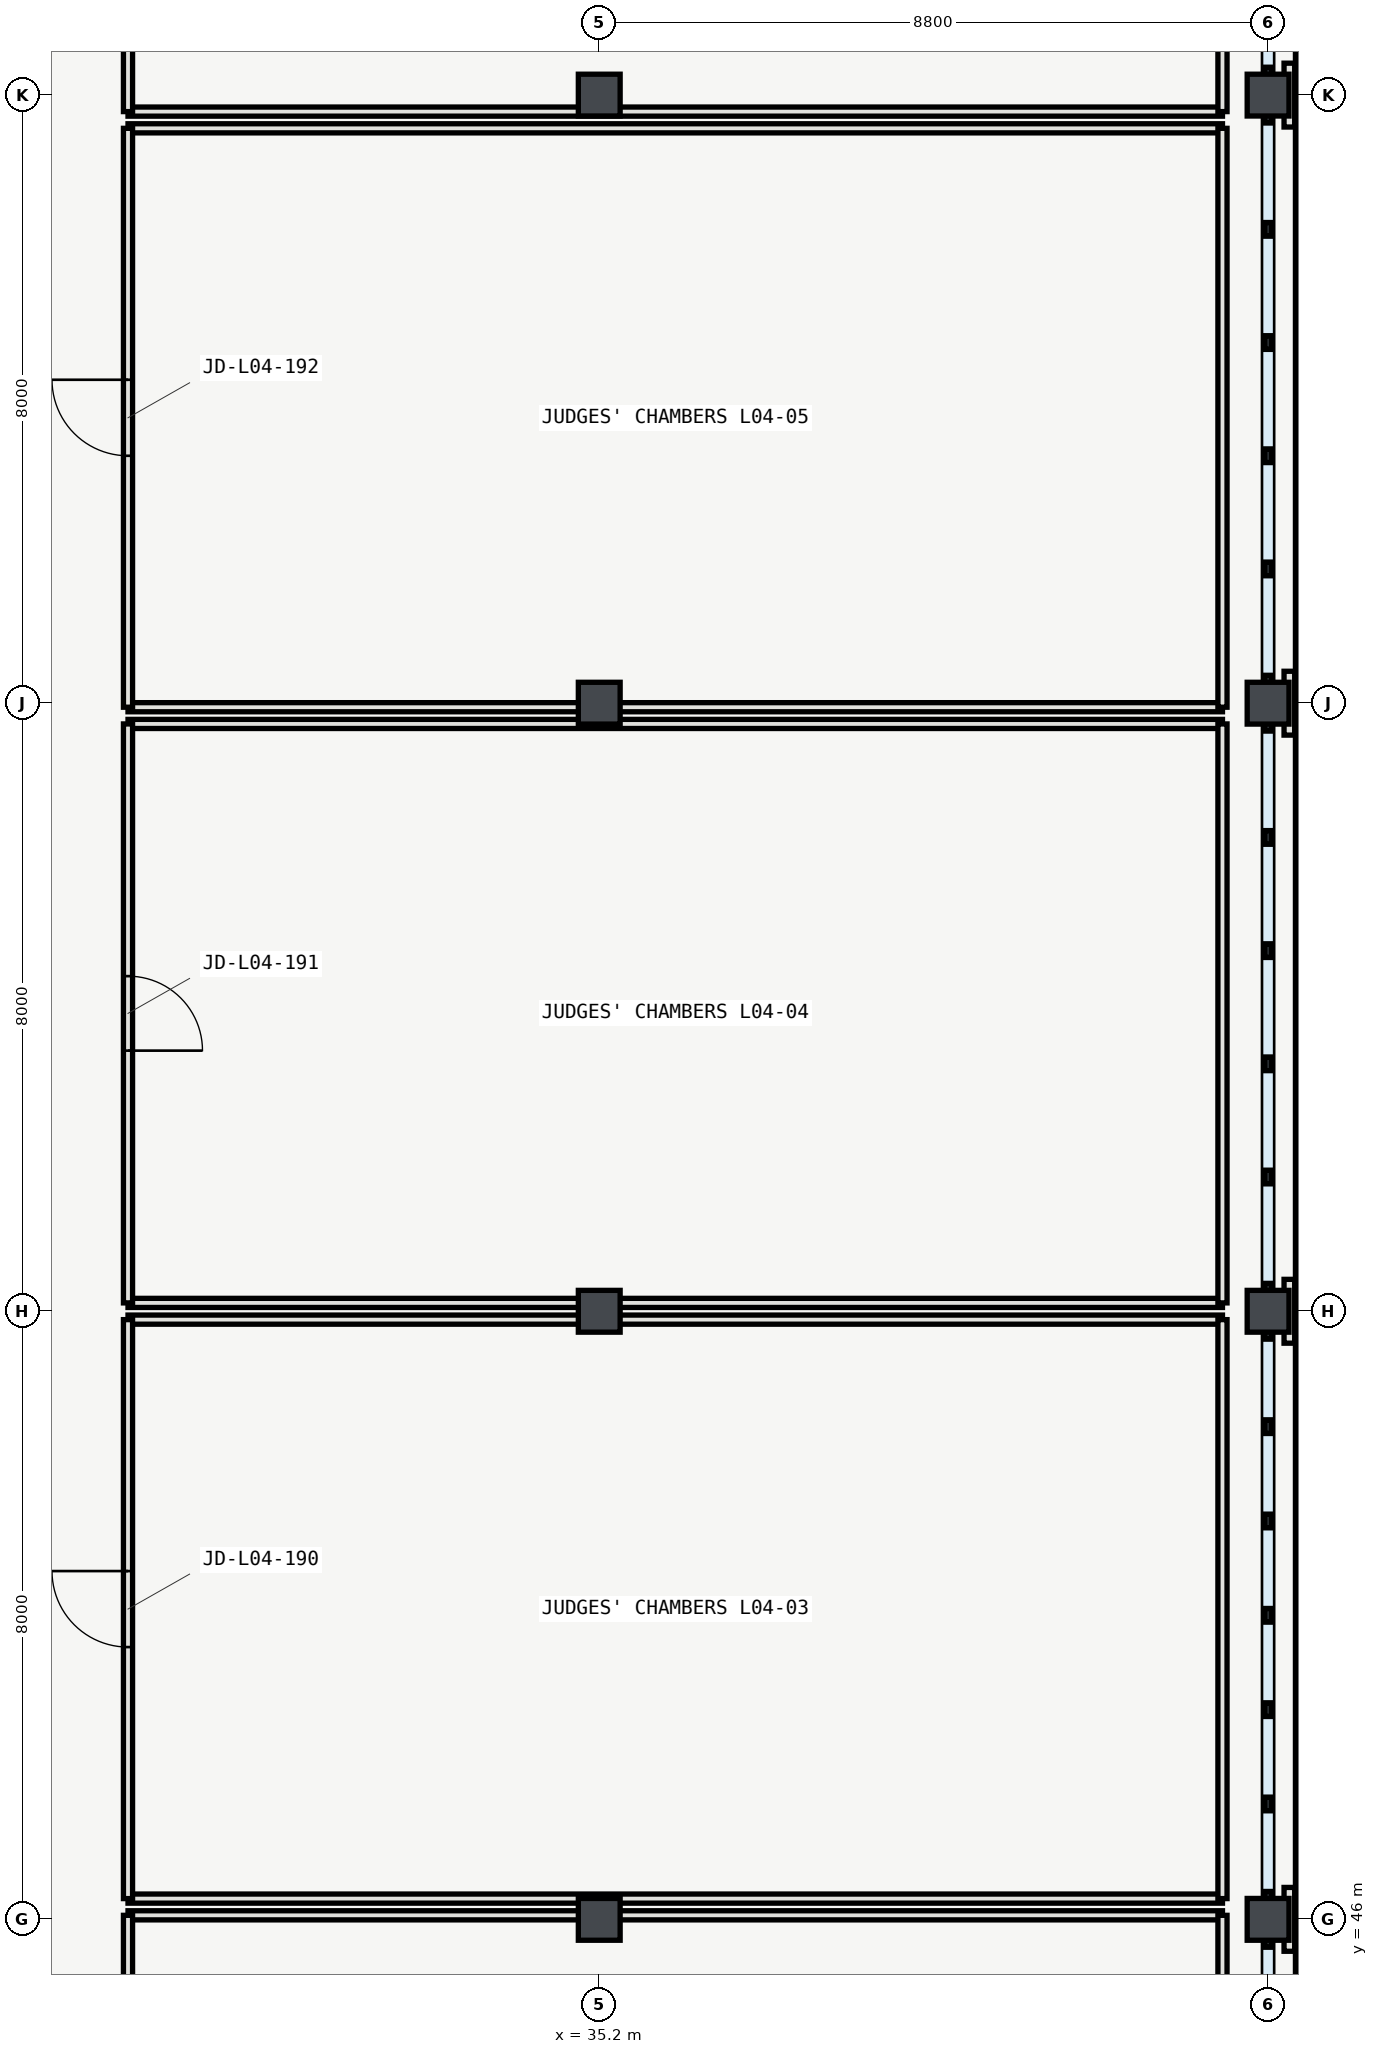
"""IFC4 building model, lengths in metres.
Left out: names, types, materials, properties, quantities, classifications, styles, units other than length and angle.
Written with IfcOpenShell. Run it as: python <this file> out.ifc"""

import sys

from ifc_helpers import new_model, si_unit, direction, frame, frame_2d, origin, origin_2d, place, context, subcontext, project, spatial, rectangle, hollow_rectangle, extrude, element, fill, save


model = new_model("IFC4")
c1 = context("Model", 3, precision=1e-05, world=origin(), true_north=direction((0.0, 1.0)))
c2 = subcontext(c1, "Body", "Model", "MODEL_VIEW")
j1 = project(units=[si_unit("LENGTHUNIT", "METRE"), si_unit("PLANEANGLEUNIT", "RADIAN")], contexts=[c1])
p1 = place(None, origin())
s1 = spatial("IfcSite", under=j1, at=p1, CompositionType="ELEMENT")
p2 = place(p1, origin())
s2 = spatial("IfcBuilding", under=s1, at=p2, CompositionType="ELEMENT")
p3 = place(p2, frame((0.0, 0.0, 20.4)))
s3 = spatial("IfcBuildingStorey", under=s2, at=p3, CompositionType="ELEMENT", Elevation=20.4)
for number, where, z_axis, x_axis in (
    (1, (35.2, 46.0, 0.0), (0.0, 0.0, 1.0), (1.0, 0.0, 0.0)),
    (2, (35.2, 54.0, 0.0), (0.0, 0.0, 1.0), (1.0, 0.0, 0.0)),
    (3, (35.2, 62.0, 0.0), (0.0, 0.0, 1.0), (1.0, 0.0, 0.0)),
    (4, (35.2, 70.0, 0.0), (0.0, 0.0, 1.0), (1.0, 0.0, 0.0)),
    (5, (44.0, 46.0, 0.0), (0.0, 0.0, 1.0), (1.0, 0.0, 0.0)),
    (6, (44.0, 54.0, 0.0), (0.0, 0.0, 1.0), (1.0, 0.0, 0.0)),
    (7, (44.0, 62.0, 0.0), (0.0, 0.0, 1.0), (1.0, 0.0, 0.0)),
    (8, (44.0, 70.0, 0.0), (0.0, 0.0, 1.0), (1.0, 0.0, 0.0)),
):
    element("IfcColumn", number, at=place(p3, frame(where, z_axis=z_axis, x_axis=x_axis)), inside=s3, PredefinedType="COLUMN", context=c2, shape_type="SweptSolid", body=[
        extrude(hollow_rectangle(XDim=0.55, YDim=0.55, WallThickness=0.022, InnerFilletRadius=0.022, OuterFilletRadius=0.044, at=origin_2d()), origin(), (0.0, 0.0, 1.0), 4.2),
    ])
p4 = place(p3, frame((44.44, 30.0, 0.0), z_axis=(0.0, 0.0, 1.0), x_axis=(0.0, 1.0, 0.0)))
e9 = element("IfcWall", 9, at=p4, inside=s3, PredefinedType="SOLIDWALL", context=c2, shape_type="SweptSolid", body=[
    extrude(rectangle(XDim=48.0, YDim=0.16, at=frame_2d((24.0, 0.0))), origin(), (0.0, 0.0, 1.0), 0.58),
])
for number, where, z_axis, x_axis in (
    (10, (44.28, 45.58, 0.0), (0.0, 0.0, 1.0), (0.0, 1.0, 0.0)),
    (11, (44.28, 53.58, 0.0), (0.0, 0.0, 1.0), (0.0, 1.0, 0.0)),
    (12, (44.28, 61.58, 0.0), (0.0, 0.0, 1.0), (0.0, 1.0, 0.0)),
    (13, (44.28, 69.58, 0.0), (0.0, 0.0, 1.0), (0.0, 1.0, 0.0)),
):
    element("IfcWall", number, at=place(p3, frame(where, z_axis=z_axis, x_axis=x_axis)), inside=s3, PredefinedType="SOLIDWALL", context=c2, shape_type="SweptSolid", body=[
        extrude(rectangle(XDim=0.84, YDim=0.14, at=frame_2d((0.42, 0.0))), origin(), (0.0, 0.0, 1.0), 3.94),
    ])
p5 = place(p3, frame((43.4, 46.053, 0.0), z_axis=(0.0, 0.0, 1.0), x_axis=(-1.0, 0.0, 0.0)))
e14 = element("IfcWall", 14, at=p5, inside=s3, PredefinedType="PARTITIONING", context=c2, shape_type="SweptSolid", body=[
    extrude(rectangle(XDim=14.4, YDim=0.12, at=frame_2d((7.2, 0.0))), origin(), (0.0, 0.0, 1.0), 3.596),
])
p6 = place(p3, frame((29.0, 46.053, 0.0), z_axis=(0.0, 0.0, 1.0), x_axis=(0.0, -1.0, 0.0)))
e15 = element("IfcWall", 15, at=p6, inside=s3, PredefinedType="PARTITIONING", context=c2, shape_type="SweptSolid", body=[
    extrude(rectangle(XDim=7.616, YDim=0.12, at=frame_2d((3.808, 0.0))), origin(), (0.0, 0.0, 1.0), 3.92),
])
p7 = place(p6, frame((3.318, 0.0, 0.0)))
e16 = element("IfcOpeningElement", 16, at=p7, cuts=e15, PredefinedType="OPENING", context=c2, shape_type="SweptSolid", body=[
    extrude(rectangle(XDim=0.98, YDim=2.2, at=frame_2d((0.49, 1.1))), frame((0.0, 0.07, 0.0), z_axis=(0.0, -1.0, 0.0), x_axis=(1.0, 0.0, 0.0)), (0.0, 0.0, 1.0), 0.14),
])
p8 = place(p3, frame((43.4, 38.437, 0.0), z_axis=(0.0, 0.0, 1.0), x_axis=(0.0, 1.0, 0.0)))
e17 = element("IfcWall", 17, at=p8, inside=s3, PredefinedType="PARTITIONING", context=c2, shape_type="SweptSolid", body=[
    extrude(rectangle(XDim=7.616, YDim=0.12, at=frame_2d((3.808, 0.0))), origin(), (0.0, 0.0, 1.0), 3.92),
])
p9 = place(p3, frame((29.0, 46.273, 0.0), z_axis=(0.0, 0.0, 1.0), x_axis=(1.0, 0.0, 0.0)))
e18 = element("IfcWall", 18, at=p9, inside=s3, PredefinedType="PARTITIONING", context=c2, shape_type="SweptSolid", body=[
    extrude(rectangle(XDim=14.4, YDim=0.12, at=frame_2d((7.2, 0.0))), origin(), (0.0, 0.0, 1.0), 3.596),
])
p10 = place(p3, frame((43.4, 53.89, 0.0), z_axis=(0.0, 0.0, 1.0), x_axis=(-1.0, 0.0, 0.0)))
e19 = element("IfcWall", 19, at=p10, inside=s3, PredefinedType="PARTITIONING", context=c2, shape_type="SweptSolid", body=[
    extrude(rectangle(XDim=14.4, YDim=0.12, at=frame_2d((7.2, 0.0))), origin(), (0.0, 0.0, 1.0), 3.546),
])
p11 = place(p3, frame((29.0, 53.89, 0.0), z_axis=(0.0, 0.0, 1.0), x_axis=(0.0, -1.0, 0.0)))
e20 = element("IfcWall", 20, at=p11, inside=s3, PredefinedType="PARTITIONING", context=c2, shape_type="SweptSolid", body=[
    extrude(rectangle(XDim=7.617, YDim=0.12, at=frame_2d((3.809, 0.0))), origin(), (0.0, 0.0, 1.0), 3.92),
])
p12 = place(p11, frame((3.308, 0.0, 0.0)))
e21 = element("IfcOpeningElement", 21, at=p12, cuts=e20, PredefinedType="OPENING", context=c2, shape_type="SweptSolid", body=[
    extrude(rectangle(XDim=1.0, YDim=2.15, at=frame_2d((0.5, 1.075))), frame((0.0, 0.07, 0.0), z_axis=(0.0, -1.0, 0.0), x_axis=(1.0, 0.0, 0.0)), (0.0, 0.0, 1.0), 0.14),
])
p13 = place(p3, frame((43.4, 46.273, 0.0), z_axis=(0.0, 0.0, 1.0), x_axis=(0.0, 1.0, 0.0)))
e22 = element("IfcWall", 22, at=p13, inside=s3, PredefinedType="PARTITIONING", context=c2, shape_type="SweptSolid", body=[
    extrude(rectangle(XDim=7.617, YDim=0.12, at=frame_2d((3.809, 0.0))), origin(), (0.0, 0.0, 1.0), 3.92),
])
p14 = place(p3, frame((29.0, 54.11, 0.0), z_axis=(0.0, 0.0, 1.0), x_axis=(1.0, 0.0, 0.0)))
e23 = element("IfcWall", 23, at=p14, inside=s3, PredefinedType="PARTITIONING", context=c2, shape_type="SweptSolid", body=[
    extrude(rectangle(XDim=14.4, YDim=0.12, at=frame_2d((7.2, 0.0))), origin(), (0.0, 0.0, 1.0), 3.546),
])
p15 = place(p3, frame((43.4, 61.727, 0.0), z_axis=(0.0, 0.0, 1.0), x_axis=(-1.0, 0.0, 0.0)))
e24 = element("IfcWall", 24, at=p15, inside=s3, PredefinedType="PARTITIONING", context=c2, shape_type="SweptSolid", body=[
    extrude(rectangle(XDim=14.4, YDim=0.12, at=frame_2d((7.2, 0.0))), origin(), (0.0, 0.0, 1.0), 3.92),
])
p16 = place(p3, frame((29.0, 61.727, 0.0), z_axis=(0.0, 0.0, 1.0), x_axis=(0.0, -1.0, 0.0)))
e25 = element("IfcWall", 25, at=p16, inside=s3, PredefinedType="PARTITIONING", context=c2, shape_type="SweptSolid", body=[
    extrude(rectangle(XDim=7.617, YDim=0.12, at=frame_2d((3.809, 0.0))), origin(), (0.0, 0.0, 1.0), 3.92),
])
p17 = place(p16, frame((3.318, 0.0, 0.0)))
e26 = element("IfcOpeningElement", 26, at=p17, cuts=e25, PredefinedType="OPENING", context=c2, shape_type="SweptSolid", body=[
    extrude(rectangle(XDim=0.98, YDim=2.15, at=frame_2d((0.49, 1.075))), frame((0.0, 0.07, 0.0), z_axis=(0.0, -1.0, 0.0), x_axis=(1.0, 0.0, 0.0)), (0.0, 0.0, 1.0), 0.14),
])
p18 = place(p3, frame((43.4, 54.11, 0.0), z_axis=(0.0, 0.0, 1.0), x_axis=(0.0, 1.0, 0.0)))
e27 = element("IfcWall", 27, at=p18, inside=s3, PredefinedType="PARTITIONING", context=c2, shape_type="SweptSolid", body=[
    extrude(rectangle(XDim=7.617, YDim=0.12, at=frame_2d((3.809, 0.0))), origin(), (0.0, 0.0, 1.0), 3.92),
])
for number, where, z_axis, x_axis in (
    (28, (29.0, 61.947, 0.0), (0.0, 0.0, 1.0), (1.0, 0.0, 0.0)),
    (29, (43.4, 69.563, 0.0), (0.0, 0.0, 1.0), (-1.0, 0.0, 0.0)),
):
    element("IfcWall", number, at=place(p3, frame(where, z_axis=z_axis, x_axis=x_axis)), inside=s3, PredefinedType="PARTITIONING", context=c2, shape_type="SweptSolid", body=[
        extrude(rectangle(XDim=14.4, YDim=0.12, at=frame_2d((7.2, 0.0))), origin(), (0.0, 0.0, 1.0), 3.92),
    ])
p19 = place(p3, frame((29.0, 69.563, 0.0), z_axis=(0.0, 0.0, 1.0), x_axis=(0.0, -1.0, 0.0)))
e30 = element("IfcWall", 30, at=p19, inside=s3, PredefinedType="PARTITIONING", context=c2, shape_type="SweptSolid", body=[
    extrude(rectangle(XDim=7.616, YDim=0.12, at=frame_2d((3.808, 0.0))), origin(), (0.0, 0.0, 1.0), 3.92),
])
p20 = place(p19, frame((3.308, 0.0, 0.0)))
e31 = element("IfcOpeningElement", 31, at=p20, cuts=e30, PredefinedType="OPENING", context=c2, shape_type="SweptSolid", body=[
    extrude(rectangle(XDim=1.0, YDim=2.2, at=frame_2d((0.5, 1.1))), frame((0.0, 0.07, 0.0), z_axis=(0.0, -1.0, 0.0), x_axis=(1.0, 0.0, 0.0)), (0.0, 0.0, 1.0), 0.14),
])
p21 = place(p3, frame((43.4, 61.947, 0.0), z_axis=(0.0, 0.0, 1.0), x_axis=(0.0, 1.0, 0.0)))
e32 = element("IfcWall", 32, at=p21, inside=s3, PredefinedType="PARTITIONING", context=c2, shape_type="SweptSolid", body=[
    extrude(rectangle(XDim=7.616, YDim=0.12, at=frame_2d((3.808, 0.0))), origin(), (0.0, 0.0, 1.0), 3.92),
])
p22 = place(p3, frame((29.0, 69.783, 0.0), z_axis=(0.0, 0.0, 1.0), x_axis=(1.0, 0.0, 0.0)))
e33 = element("IfcWall", 33, at=p22, inside=s3, PredefinedType="PARTITIONING", context=c2, shape_type="SweptSolid", body=[
    extrude(rectangle(XDim=14.4, YDim=0.12, at=frame_2d((7.2, 0.0))), origin(), (0.0, 0.0, 1.0), 3.546),
])
p23 = place(p3, frame((29.0, 77.4, 0.0), z_axis=(0.0, 0.0, 1.0), x_axis=(0.0, -1.0, 0.0)))
e34 = element("IfcWall", 34, at=p23, inside=s3, PredefinedType="PARTITIONING", context=c2, shape_type="SweptSolid", body=[
    extrude(rectangle(XDim=7.617, YDim=0.12, at=frame_2d((3.809, 0.0))), origin(), (0.0, 0.0, 1.0), 3.92),
])
p24 = place(p23, frame((2.715, 0.0, 0.0)))
e35 = element("IfcOpeningElement", 35, at=p24, cuts=e34, PredefinedType="OPENING", context=c2, shape_type="SweptSolid", body=[
    extrude(rectangle(XDim=0.98, YDim=2.2, at=frame_2d((0.49, 1.1))), frame((0.0, 0.07, 0.0), z_axis=(0.0, -1.0, 0.0), x_axis=(1.0, 0.0, 0.0)), (0.0, 0.0, 1.0), 0.14),
])
p25 = place(p3, frame((43.4, 69.783, 0.0), z_axis=(0.0, 0.0, 1.0), x_axis=(0.0, 1.0, 0.0)))
e36 = element("IfcWall", 36, at=p25, inside=s3, PredefinedType="PARTITIONING", context=c2, shape_type="SweptSolid", body=[
    extrude(rectangle(XDim=7.617, YDim=0.12, at=frame_2d((3.809, 0.0))), origin(), (0.0, 0.0, 1.0), 3.92),
])
p26 = place(p12, origin())
e37 = element("IfcDoor", 37, at=p26, inside=s3, OperationType="SINGLE_SWING_LEFT", PredefinedType="DOOR", context=c2, shape_type="SweptSolid", body=[
    extrude(rectangle(XDim=1.0, YDim=2.15, at=frame_2d((0.5, 1.075))), frame((0.0, 0.025, 0.0), z_axis=(0.0, -1.0, 0.0), x_axis=(1.0, 0.0, 0.0)), (0.0, 0.0, 1.0), 0.05),
])
fill(e21, e37)
p27 = place(p17, origin())
e38 = element("IfcDoor", 38, at=p27, inside=s3, OperationType="SINGLE_SWING_RIGHT", PredefinedType="DOOR", context=c2, shape_type="SweptSolid", body=[
    extrude(rectangle(XDim=0.98, YDim=2.15, at=frame_2d((0.49, 1.075))), frame((0.0, 0.025, 0.0), z_axis=(0.0, -1.0, 0.0), x_axis=(1.0, 0.0, 0.0)), (0.0, 0.0, 1.0), 0.05),
])
fill(e26, e38)
p28 = place(p20, origin())
e39 = element("IfcDoor", 39, at=p28, inside=s3, OperationType="SINGLE_SWING_LEFT", PredefinedType="DOOR", context=c2, shape_type="SweptSolid", body=[
    extrude(rectangle(XDim=1.0, YDim=2.2, at=frame_2d((0.5, 1.1))), frame((0.0, 0.025, 0.0), z_axis=(0.0, -1.0, 0.0), x_axis=(1.0, 0.0, 0.0)), (0.0, 0.0, 1.0), 0.05),
])
fill(e31, e39)
save(model, sys.argv[1])
